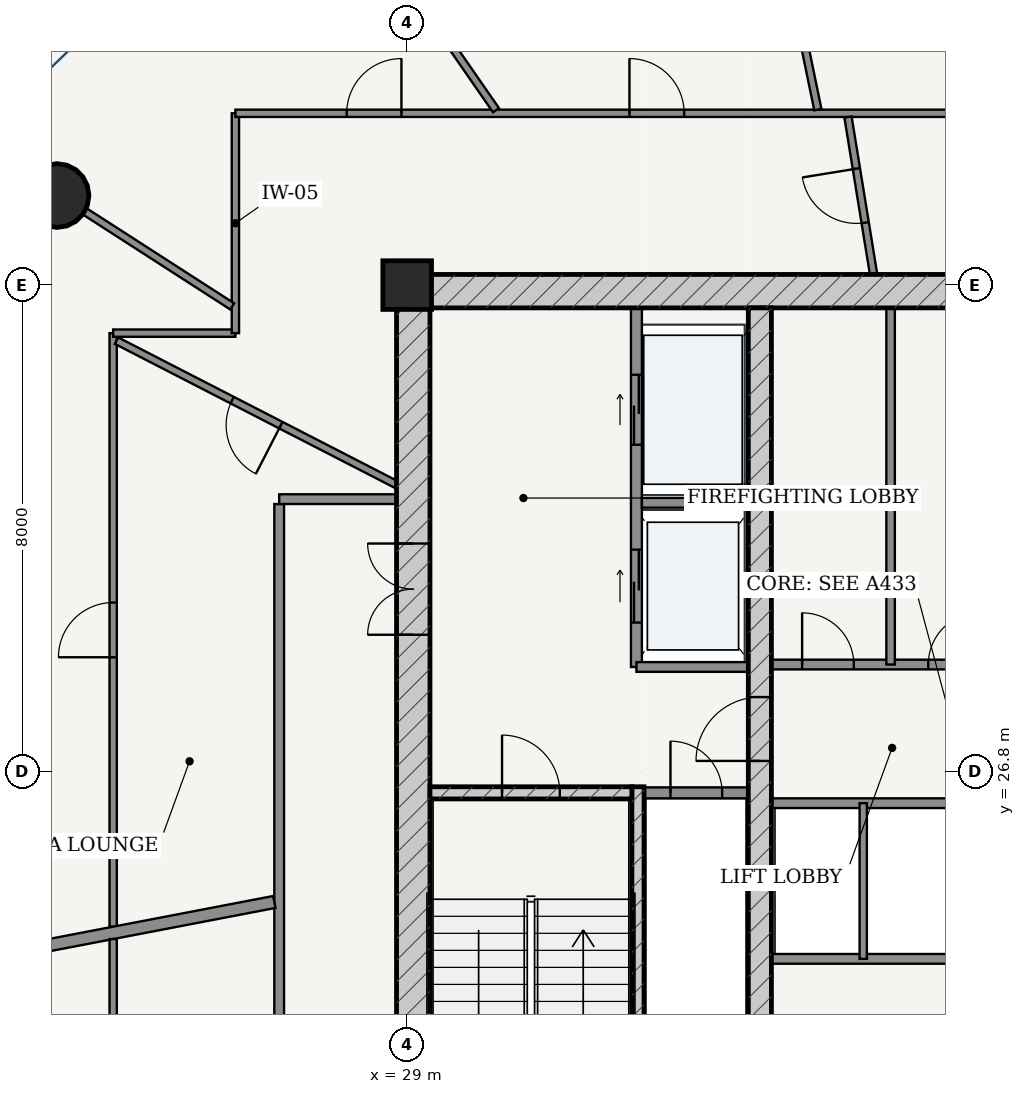
"""IFC4 building model, lengths in metres.
Left out: names, types, materials, properties, quantities, classifications, styles, units other than length and angle.
Written with IfcOpenShell. Run it as: python <this file> out.ifc"""

import sys

from ifc_helpers import new_model, si_unit, direction, frame, frame_2d, origin, origin_2d, place, context, subcontext, project, spatial, rectangle, hollow_circle, extrude, source, transform, mapped, element, fill, save


model = new_model("IFC4")
c1 = context("Model", 3, precision=1e-05, world=origin(), true_north=direction((-0.2419218956, 0.970295726276)))
c2 = subcontext(c1, "Body", "Model", "MODEL_VIEW")
j1 = project(units=[si_unit("LENGTHUNIT", "METRE"), si_unit("PLANEANGLEUNIT", "RADIAN")], contexts=[c1])
p1 = place(None, origin())
s1 = spatial("IfcSite", under=j1, at=p1, CompositionType="ELEMENT")
p2 = place(p1, origin())
s2 = spatial("IfcBuilding", under=s1, at=p2, CompositionType="ELEMENT")
p3 = place(p2, frame((0.0, 0.0, 248.2)))
s3 = spatial("IfcBuildingStorey", under=s2, at=p3, CompositionType="ELEMENT", Elevation=248.2)
p4 = place(p3, frame((29.0, 34.8, 0.0), z_axis=(0.0, 0.0, 1.0), x_axis=(1.0, 0.0, 0.0)))
e1 = element("IfcColumn", 1, at=p4, inside=s3, PredefinedType="COLUMN", context=c2, shape_type="SweptSolid", body=[
    extrude(rectangle(XDim=0.8, YDim=0.8, at=origin_2d()), origin(), (0.0, 0.0, 1.0), 3.75),
])
p5 = place(p3, frame((28.825, 34.7, 0.0), z_axis=(0.0, 0.0, 1.0), x_axis=(1.0, 0.0, 0.0)))
e2 = element("IfcWall", 2, at=p5, inside=s3, PredefinedType="SHEAR", context=c2, shape_type="SweptSolid", body=[
    extrude(rectangle(XDim=18.35, YDim=0.55, at=frame_2d((9.175, 0.0))), origin(), (0.0, 0.0, 1.0), 3.49),
])
p6 = place(p3, frame((29.1, 19.175, 0.0), z_axis=(0.0, 0.0, 1.0), x_axis=(0.0, 1.0, 0.0)))
e3 = element("IfcWall", 3, at=p6, inside=s3, PredefinedType="SHEAR", context=c2, shape_type="SweptSolid", body=[
    extrude(rectangle(XDim=15.25, YDim=0.55, at=frame_2d((7.625, 0.0))), origin(), (0.0, 0.0, 1.0), 3.49),
])
p7 = place(p6, frame((9.875, 0.0, 0.0)))
e4 = element("IfcOpeningElement", 4, at=p7, cuts=e3, PredefinedType="OPENING", context=c2, shape_type="SweptSolid", body=[
    extrude(rectangle(XDim=1.5, YDim=2.2, at=frame_2d((0.75, 1.1))), frame((0.0, 0.285, 0.0), z_axis=(0.0, -1.0, 0.0), x_axis=(1.0, 0.0, 0.0)), (0.0, 0.0, 1.0), 0.57),
])
p8 = place(p3, frame((32.795, 19.175, 0.0), z_axis=(0.0, 0.0, 1.0), x_axis=(0.0, 1.0, 0.0)))
e5 = element("IfcWall", 5, at=p8, inside=s3, PredefinedType="SOLIDWALL", context=c2, shape_type="SweptSolid", body=[
    extrude(rectangle(XDim=7.375, YDim=0.2, at=frame_2d((3.688, 0.0))), origin(), (0.0, 0.0, 1.0), 3.49),
])
p9 = place(p3, frame((29.375, 26.45, 0.0), z_axis=(0.0, 0.0, 1.0), x_axis=(1.0, 0.0, 0.0)))
e6 = element("IfcWall", 6, at=p9, inside=s3, PredefinedType="SOLIDWALL", context=c2, shape_type="SweptSolid", body=[
    extrude(rectangle(XDim=3.32, YDim=0.2, at=frame_2d((1.66, 0.0))), origin(), (0.0, 0.0, 1.0), 3.49),
])
p10 = place(p9, frame((1.185, 0.0, 0.0)))
e7 = element("IfcOpeningElement", 7, at=p10, cuts=e6, PredefinedType="OPENING", context=c2, shape_type="SweptSolid", body=[
    extrude(rectangle(XDim=0.95, YDim=2.15, at=frame_2d((0.475, 1.075))), frame((0.0, 0.11, 0.0), z_axis=(0.0, -1.0, 0.0), x_axis=(1.0, 0.0, 0.0)), (0.0, 0.0, 1.0), 0.22),
])
p11 = place(p3, frame((34.8, 19.175, 0.0), z_axis=(0.0, 0.0, 1.0), x_axis=(0.0, 1.0, 0.0)))
e8 = element("IfcWall", 8, at=p11, inside=s3, PredefinedType="SHEAR", context=c2, shape_type="SweptSolid", body=[
    extrude(rectangle(XDim=15.25, YDim=0.38, at=frame_2d((7.625, 0.0))), origin(), (0.0, 0.0, 1.0), 3.49),
])
p12 = place(p11, frame((7.8, 0.0, 0.0)))
e9 = element("IfcOpeningElement", 9, at=p12, cuts=e8, PredefinedType="OPENING", context=c2, shape_type="SweptSolid", body=[
    extrude(rectangle(XDim=1.05, YDim=2.15, at=frame_2d((0.525, 1.075))), frame((0.0, 0.2, 0.0), z_axis=(0.0, -1.0, 0.0), x_axis=(1.0, 0.0, 0.0)), (0.0, 0.0, 1.0), 0.4),
])
p13 = place(p3, frame((23.241, 36.272, 0.0), z_axis=(0.0, 0.0, 1.0), x_axis=(1.0, 0.0, 0.0)))
e10 = element("IfcColumn", 10, at=p13, inside=s3, PredefinedType="COLUMN", context=c2, shape_type="SweptSolid", body=[
    extrude(hollow_circle(Radius=0.525, WallThickness=0.035, at=origin_2d()), origin(), (0.0, 0.0, 1.0), 3.75),
])
p14 = place(p3, frame((32.9, 26.45, 0.0), z_axis=(0.0, 0.0, 1.0), x_axis=(1.0, 0.0, 0.0)))
e11 = element("IfcWall", 11, at=p14, inside=s3, PredefinedType="PARTITIONING", context=c2, shape_type="SweptSolid", body=[
    extrude(rectangle(XDim=1.71, YDim=0.18, at=frame_2d((0.855, 0.0))), origin(), (0.0, 0.0, 1.0), 3.49),
])
p15 = place(p14, frame((0.43, 0.0, 0.0)))
e12 = element("IfcOpeningElement", 12, at=p15, cuts=e11, PredefinedType="OPENING", context=c2, shape_type="SweptSolid", body=[
    extrude(rectangle(XDim=0.85, YDim=2.1, at=frame_2d((0.425, 1.05))), frame((0.0, 0.1, 0.0), z_axis=(0.0, -1.0, 0.0), x_axis=(1.0, 0.0, 0.0)), (0.0, 0.0, 1.0), 0.2),
])
p16 = place(p3, frame((32.77, 28.52, 0.0), z_axis=(0.0, 0.0, 1.0), x_axis=(0.0, 1.0, 0.0)))
e13 = element("IfcWall", 13, at=p16, inside=s3, PredefinedType="PARTITIONING", context=c2, shape_type="SweptSolid", body=[
    extrude(rectangle(XDim=5.905, YDim=0.18, at=frame_2d((2.953, 0.0))), origin(), (0.0, 0.0, 1.0), 3.49),
])
p17 = place(p16, frame((3.655, 0.0, 0.0)))
e14 = element("IfcOpeningElement", 14, at=p17, cuts=e13, PredefinedType="OPENING", context=c2, shape_type="SweptSolid", body=[
    extrude(rectangle(XDim=1.15, YDim=2.2, at=frame_2d((0.575, 1.1))), frame((0.0, 0.1, 0.0), z_axis=(0.0, -1.0, 0.0), x_axis=(1.0, 0.0, 0.0)), (0.0, 0.0, 1.0), 0.2),
])
p18 = place(p16, frame((0.73, 0.0, 0.0)))
e15 = element("IfcOpeningElement", 15, at=p18, cuts=e13, PredefinedType="OPENING", context=c2, shape_type="SweptSolid", body=[
    extrude(rectangle(XDim=1.2, YDim=2.25, at=frame_2d((0.6, 1.125))), frame((0.0, 0.1, 0.0), z_axis=(0.0, -1.0, 0.0), x_axis=(1.0, 0.0, 0.0)), (0.0, 0.0, 1.0), 0.2),
])
p19 = place(p3, frame((32.86, 31.22, 0.0), z_axis=(0.0, 0.0, 1.0), x_axis=(1.0, 0.0, 0.0)))
e16 = element("IfcWall", 16, at=p19, inside=s3, PredefinedType="PARTITIONING", context=c2, shape_type="SweptSolid", body=[
    extrude(rectangle(XDim=1.75, YDim=0.16, at=frame_2d((0.875, 0.0))), origin(), (0.0, 0.0, 1.0), 3.49),
])
p20 = place(p3, frame((32.77, 28.52, 0.0), z_axis=(0.0, 0.0, 1.0), x_axis=(1.0, 0.0, 0.0)))
e17 = element("IfcWall", 17, at=p20, inside=s3, PredefinedType="PARTITIONING", context=c2, shape_type="SweptSolid", body=[
    extrude(rectangle(XDim=1.84, YDim=0.16, at=frame_2d((0.92, 0.0))), origin(), (0.0, 0.0, 1.0), 3.49),
])
p21 = place(p3, frame((34.99, 28.56, 0.0), z_axis=(0.0, 0.0, 1.0), x_axis=(1.0, 0.0, 0.0)))
e18 = element("IfcWall", 18, at=p21, inside=s3, PredefinedType="PARTITIONING", context=c2, shape_type="SweptSolid", body=[
    extrude(rectangle(XDim=6.02, YDim=0.16, at=frame_2d((3.01, 0.0))), origin(), (0.0, 0.0, 1.0), 3.49),
])
p22 = place(p21, frame((0.505, 0.0, 0.0)))
e19 = element("IfcOpeningElement", 19, at=p22, cuts=e18, PredefinedType="OPENING", context=c2, shape_type="SweptSolid", body=[
    extrude(rectangle(XDim=0.85, YDim=2.1, at=frame_2d((0.425, 1.05))), frame((0.0, 0.09, 0.0), z_axis=(0.0, -1.0, 0.0), x_axis=(1.0, 0.0, 0.0)), (0.0, 0.0, 1.0), 0.18),
])
p23 = place(p21, frame((2.58, 0.0, 0.0)))
e20 = element("IfcOpeningElement", 20, at=p23, cuts=e18, PredefinedType="OPENING", context=c2, shape_type="SweptSolid", body=[
    extrude(rectangle(XDim=0.86, YDim=2.1, at=frame_2d((0.43, 1.05))), frame((0.0, 0.09, 0.0), z_axis=(0.0, -1.0, 0.0), x_axis=(1.0, 0.0, 0.0)), (0.0, 0.0, 1.0), 0.18),
])
p24 = place(p21, frame((4.665, 0.0, 0.0)))
e21 = element("IfcOpeningElement", 21, at=p24, cuts=e18, PredefinedType="OPENING", context=c2, shape_type="SweptSolid", body=[
    extrude(rectangle(XDim=0.85, YDim=2.1, at=frame_2d((0.425, 1.05))), frame((0.0, 0.09, 0.0), z_axis=(0.0, -1.0, 0.0), x_axis=(1.0, 0.0, 0.0)), (0.0, 0.0, 1.0), 0.18),
])
p25 = place(p3, frame((36.95, 28.56, 0.0), z_axis=(0.0, 0.0, 1.0), x_axis=(0.0, 1.0, 0.0)))
e22 = element("IfcWall", 22, at=p25, inside=s3, PredefinedType="PARTITIONING", context=c2, shape_type="SweptSolid", body=[
    extrude(rectangle(XDim=5.865, YDim=0.14, at=frame_2d((2.933, 0.0))), origin(), (0.0, 0.0, 1.0), 3.49),
])
p26 = place(p3, frame((34.99, 26.28, 0.0), z_axis=(0.0, 0.0, 1.0), x_axis=(1.0, 0.0, 0.0)))
e23 = element("IfcWall", 23, at=p26, inside=s3, PredefinedType="PARTITIONING", context=c2, shape_type="SweptSolid", body=[
    extrude(rectangle(XDim=6.02, YDim=0.16, at=frame_2d((3.01, 0.0))), origin(), (0.0, 0.0, 1.0), 3.49),
])
p27 = place(p26, frame((3.215, 0.0, 0.0)))
e24 = element("IfcOpeningElement", 24, at=p27, cuts=e23, PredefinedType="OPENING", context=c2, shape_type="SweptSolid", body=[
    extrude(rectangle(XDim=1.1, YDim=2.2, at=frame_2d((0.55, 1.1))), frame((0.0, 0.09, 0.0), z_axis=(0.0, -1.0, 0.0), x_axis=(1.0, 0.0, 0.0)), (0.0, 0.0, 1.0), 0.18),
])
p28 = place(p26, frame((4.695, 0.0, 0.0)))
e25 = element("IfcOpeningElement", 25, at=p28, cuts=e23, PredefinedType="OPENING", context=c2, shape_type="SweptSolid", body=[
    extrude(rectangle(XDim=1.1, YDim=2.2, at=frame_2d((0.55, 1.1))), frame((0.0, 0.09, 0.0), z_axis=(0.0, -1.0, 0.0), x_axis=(1.0, 0.0, 0.0)), (0.0, 0.0, 1.0), 0.18),
])
p29 = place(p3, frame((34.99, 23.72, 0.0), z_axis=(0.0, 0.0, 1.0), x_axis=(1.0, 0.0, 0.0)))
e26 = element("IfcWall", 26, at=p29, inside=s3, PredefinedType="PARTITIONING", context=c2, shape_type="SweptSolid", body=[
    extrude(rectangle(XDim=6.02, YDim=0.16, at=frame_2d((3.01, 0.0))), origin(), (0.0, 0.0, 1.0), 3.49),
])
p30 = place(p3, frame((36.5, 23.72, 0.0), z_axis=(0.0, 0.0, 1.0), x_axis=(0.0, 1.0, 0.0)))
e27 = element("IfcWall", 27, at=p30, inside=s3, PredefinedType="PARTITIONING", context=c2, shape_type="SweptSolid", body=[
    extrude(rectangle(XDim=2.56, YDim=0.12, at=frame_2d((1.28, 0.0))), origin(), (0.0, 0.0, 1.0), 3.49),
])
p31 = place(p3, frame((26.895, 17.275, 0.0), z_axis=(0.0, 0.0, 1.0), x_axis=(0.0, 1.0, 0.0)))
e28 = element("IfcWall", 28, at=p31, inside=s3, PredefinedType="PARTITIONING", context=c2, shape_type="SweptSolid", body=[
    extrude(rectangle(XDim=13.925, YDim=0.16, at=frame_2d((6.962, 0.0))), origin(), (0.0, 0.0, 1.0), 3.015),
])
p32 = place(p3, frame((26.895, 31.28, 0.0), z_axis=(0.0, 0.0, 1.0), x_axis=(1.0, 0.0, 0.0)))
e29 = element("IfcWall", 29, at=p32, inside=s3, PredefinedType="PARTITIONING", context=c2, shape_type="SweptSolid", body=[
    extrude(rectangle(XDim=1.93, YDim=0.16, at=frame_2d((0.965, 0.0))), origin(), (0.0, 0.0, 1.0), 3.49),
])
p33 = place(p3, frame((24.165, 24.249, 0.0), z_axis=(0.0, 0.0, 1.0), x_axis=(0.0, 1.0, 0.0)))
e30 = element("IfcWall", 30, at=p33, inside=s3, PredefinedType="PARTITIONING", context=c2, shape_type="SweptSolid", body=[
    extrude(rectangle(XDim=9.761, YDim=0.12, at=frame_2d((4.88, 0.0))), origin(), (0.0, 0.0, 1.0), 3.015),
])
p34 = place(p33, frame((4.43, 0.0, 0.0)))
e31 = element("IfcOpeningElement", 31, at=p34, cuts=e30, PredefinedType="OPENING", context=c2, shape_type="SweptSolid", body=[
    extrude(rectangle(XDim=0.9, YDim=2.15, at=frame_2d((0.45, 1.075))), frame((0.0, 0.07, 0.0), z_axis=(0.0, -1.0, 0.0), x_axis=(1.0, 0.0, 0.0)), (0.0, 0.0, 1.0), 0.14),
])
p35 = place(p3, frame((24.165, 34.01, 0.0), z_axis=(0.0, 0.0, 1.0), x_axis=(1.0, 0.0, 0.0)))
e32 = element("IfcWall", 32, at=p35, inside=s3, PredefinedType="PARTITIONING", context=c2, shape_type="SweptSolid", body=[
    extrude(rectangle(XDim=2.01, YDim=0.12, at=frame_2d((1.005, 0.0))), origin(), (0.0, 0.0, 1.0), 3.209),
])
p36 = place(p3, frame((26.175, 34.01, 0.0), z_axis=(0.0, 0.0, 1.0), x_axis=(0.0, 1.0, 0.0)))
e33 = element("IfcWall", 33, at=p36, inside=s3, PredefinedType="PARTITIONING", context=c2, shape_type="SweptSolid", body=[
    extrude(rectangle(XDim=3.615, YDim=0.12, at=frame_2d((1.808, 0.0))), origin(), (0.0, 0.0, 1.0), 3.015),
])
p37 = place(p3, frame((26.175, 37.625, 0.0), z_axis=(0.0, 0.0, 1.0), x_axis=(1.0, 0.0, 0.0)))
e34 = element("IfcWall", 34, at=p37, inside=s3, PredefinedType="PARTITIONING", context=c2, shape_type="SweptSolid", body=[
    extrude(rectangle(XDim=23.65, YDim=0.12, at=frame_2d((11.825, 0.0))), origin(), (0.0, 0.0, 1.0), 3.015),
])
p38 = place(p37, frame((12.791, 0.0, 0.0)))
e35 = element("IfcOpeningElement", 35, at=p38, cuts=e34, PredefinedType="OPENING", context=c2, shape_type="SweptSolid", body=[
    extrude(rectangle(XDim=0.9, YDim=2.15, at=frame_2d((0.45, 1.075))), frame((0.0, 0.07, 0.0), z_axis=(0.0, -1.0, 0.0), x_axis=(1.0, 0.0, 0.0)), (0.0, 0.0, 1.0), 0.14),
])
p39 = place(p37, frame((6.48, 0.0, 0.0)))
e36 = element("IfcOpeningElement", 36, at=p39, cuts=e34, PredefinedType="OPENING", context=c2, shape_type="SweptSolid", body=[
    extrude(rectangle(XDim=0.9, YDim=2.15, at=frame_2d((0.45, 1.075))), frame((0.0, 0.07, 0.0), z_axis=(0.0, -1.0, 0.0), x_axis=(1.0, 0.0, 0.0)), (0.0, 0.0, 1.0), 0.14),
])
p40 = place(p37, frame((1.831, 0.0, 0.0)))
e37 = element("IfcOpeningElement", 37, at=p40, cuts=e34, PredefinedType="OPENING", context=c2, shape_type="SweptSolid", body=[
    extrude(rectangle(XDim=0.9, YDim=2.15, at=frame_2d((0.45, 1.075))), frame((0.0, 0.07, 0.0), z_axis=(0.0, -1.0, 0.0), x_axis=(1.0, 0.0, 0.0)), (0.0, 0.0, 1.0), 0.14),
])
p41 = place(p3, frame((35.754, 37.686, 0.0), z_axis=(0.0, 0.0, 1.0), x_axis=(-0.202105877204, 0.979363678313, 0.0)))
e38 = element("IfcWall", 38, at=p41, inside=s3, PredefinedType="PARTITIONING", context=c2, shape_type="SweptSolid", body=[
    extrude(rectangle(XDim=7.512, YDim=0.12, at=frame_2d((3.756, 0.0))), origin(), (0.0, 0.0, 1.0), 3.015),
])
p42 = place(p3, frame((30.461, 37.676, 0.0), z_axis=(0.0, 0.0, 1.0), x_axis=(-0.569689482466, 0.821860020665, 0.0)))
e39 = element("IfcWall", 39, at=p42, inside=s3, PredefinedType="PARTITIONING", context=c2, shape_type="SweptSolid", body=[
    extrude(rectangle(XDim=5.585, YDim=0.12, at=frame_2d((2.792, 0.0))), origin(), (0.0, 0.0, 1.0), 3.015),
])
p43 = place(p3, frame((26.123, 34.45, 0.0), z_axis=(0.0, 0.0, 1.0), x_axis=(-0.840703033126, 0.541496454367, 0.0)))
e40 = element("IfcWall", 40, at=p43, inside=s3, PredefinedType="PARTITIONING", context=c2, shape_type="SweptSolid", body=[
    extrude(rectangle(XDim=4.958, YDim=0.12, at=frame_2d((2.479, 0.0))), origin(), (0.0, 0.0, 1.0), 3.015),
])
p44 = place(p3, frame((36.67, 34.977, 0.0), z_axis=(0.0, 0.0, 1.0), x_axis=(-0.160605953374, 0.98701860557, 0.0)))
e41 = element("IfcWall", 41, at=p44, inside=s3, PredefinedType="PARTITIONING", context=c2, shape_type="SweptSolid", body=[
    extrude(rectangle(XDim=2.621, YDim=0.12, at=frame_2d((1.31, 0.0))), origin(), (0.0, 0.0, 1.0), 2.575),
])
p45 = place(p44, frame((0.86, 0.0, 0.0)))
e42 = element("IfcOpeningElement", 42, at=p45, cuts=e41, PredefinedType="OPENING", context=c2, shape_type="SweptSolid", body=[
    extrude(rectangle(XDim=0.9, YDim=2.15, at=frame_2d((0.45, 1.075))), frame((0.0, 0.07, 0.0), z_axis=(0.0, -1.0, 0.0), x_axis=(1.0, 0.0, 0.0)), (0.0, 0.0, 1.0), 0.14),
])
p46 = place(p3, frame((28.825, 31.518, 0.0), z_axis=(0.0, 0.0, 1.0), x_axis=(-0.889305882583, 0.457312854842, 0.0)))
e43 = element("IfcWall", 43, at=p46, inside=s3, PredefinedType="PARTITIONING", context=c2, shape_type="SweptSolid", body=[
    extrude(rectangle(XDim=5.178, YDim=0.12, at=frame_2d((2.589, 0.0))), origin(), (0.0, 0.0, 1.0), 3.209),
])
p47 = place(p46, frame((2.139, 0.0, 0.0)))
e44 = element("IfcOpeningElement", 44, at=p47, cuts=e43, PredefinedType="OPENING", context=c2, shape_type="SweptSolid", body=[
    extrude(rectangle(XDim=0.9, YDim=2.15, at=frame_2d((0.45, 1.075))), frame((0.0, 0.07, 0.0), z_axis=(0.0, -1.0, 0.0), x_axis=(1.0, 0.0, 0.0)), (0.0, 0.0, 1.0), 0.14),
])
p48 = place(p3, frame((26.815, 24.656, 0.0), z_axis=(0.0, 0.0, 1.0), x_axis=(-0.982109889803, -0.188308694305, 0.0)))
e45 = element("IfcWall", 45, at=p48, inside=s3, PredefinedType="PARTITIONING", context=c2, shape_type="SweptSolid", body=[
    extrude(rectangle(XDim=7.884, YDim=0.2, at=frame_2d((3.942, 0.0))), origin(), (0.0, 0.0, 1.0), 3.015),
])
p49 = place(p3, frame((24.165, 14.465, 0.0), z_axis=(0.0, 0.0, 1.0), x_axis=(0.0, 1.0, 0.0)))
e46 = element("IfcWall", 46, at=p49, inside=s3, PredefinedType="PARTITIONING", context=c2, shape_type="SweptSolid", body=[
    extrude(rectangle(XDim=9.58, YDim=0.12, at=frame_2d((4.79, 0.0))), origin(), (0.0, 0.0, 1.0), 3.015),
])
p50 = place(p49, frame((0.879, 0.0, 0.0)))
e47 = element("IfcOpeningElement", 47, at=p50, cuts=e46, PredefinedType="OPENING", context=c2, shape_type="SweptSolid", body=[
    extrude(rectangle(XDim=0.9, YDim=2.15, at=frame_2d((0.45, 1.075))), frame((0.0, 0.07, 0.0), z_axis=(0.0, -1.0, 0.0), x_axis=(1.0, 0.0, 0.0)), (0.0, 0.0, 1.0), 0.14),
])
m1 = source(origin(), c2, "Body", "SweptSolid", [
    extrude(rectangle(XDim=1.5, YDim=2.2, at=frame_2d((0.75, 1.1))), frame((0.0, 0.025, 0.0), z_axis=(0.0, -1.0, 0.0), x_axis=(1.0, 0.0, 0.0)), (0.0, 0.0, 1.0), 0.05),
])
p51 = place(p7, origin())
e48 = element("IfcDoor", 48, at=p51, inside=s3, OperationType="DOUBLE_DOOR_SINGLE_SWING", PredefinedType="DOOR", context=c2, shape_type="MappedRepresentation", body=[
    mapped(m1, transform((0.0, 0.0, 0.0), scale=1.0)),
])
fill(e4, e48)
m2 = source(origin(), c2, "Body", "SweptSolid", [
    extrude(rectangle(XDim=1.05, YDim=2.15, at=frame_2d((0.525, 1.075))), frame((0.0, 0.025, 0.0), z_axis=(0.0, -1.0, 0.0), x_axis=(1.0, 0.0, 0.0)), (0.0, 0.0, 1.0), 0.05),
])
p52 = place(p12, origin())
e49 = element("IfcDoor", 49, at=p52, inside=s3, OperationType="SINGLE_SWING_LEFT", PredefinedType="DOOR", context=c2, shape_type="MappedRepresentation", body=[
    mapped(m2, transform((0.0, 0.0, 0.0), scale=1.0)),
])
fill(e9, e49)
m3 = source(origin(), c2, "Body", "SweptSolid", [
    extrude(rectangle(XDim=0.95, YDim=2.15, at=frame_2d((0.475, 1.075))), frame((0.0, 0.025, 0.0), z_axis=(0.0, -1.0, 0.0), x_axis=(1.0, 0.0, 0.0)), (0.0, 0.0, 1.0), 0.05),
])
p53 = place(p10, origin())
e50 = element("IfcDoor", 50, at=p53, inside=s3, OperationType="SINGLE_SWING_LEFT", PredefinedType="DOOR", context=c2, shape_type="MappedRepresentation", body=[
    mapped(m3, transform((0.0, 0.0, 0.0), scale=1.0)),
])
fill(e7, e50)
m4 = source(origin(), c2, "Body", "SweptSolid", [
    extrude(rectangle(XDim=0.85, YDim=2.1, at=frame_2d((0.425, 1.05))), frame((0.0, 0.025, 0.0), z_axis=(0.0, -1.0, 0.0), x_axis=(1.0, 0.0, 0.0)), (0.0, 0.0, 1.0), 0.05),
])
p54 = place(p15, origin())
e51 = element("IfcDoor", 51, at=p54, inside=s3, OperationType="SINGLE_SWING_LEFT", PredefinedType="DOOR", context=c2, shape_type="MappedRepresentation", body=[
    mapped(m4, transform((0.0, 0.0, 0.0), scale=1.0)),
])
fill(e12, e51)
p55 = place(p22, origin())
e52 = element("IfcDoor", 52, at=p55, inside=s3, OperationType="SINGLE_SWING_LEFT", PredefinedType="DOOR", context=c2, shape_type="MappedRepresentation", body=[
    mapped(m4, transform((0.0, 0.0, 0.0), scale=1.0)),
])
fill(e19, e52)
m5 = source(origin(), c2, "Body", "SweptSolid", [
    extrude(rectangle(XDim=0.86, YDim=2.1, at=frame_2d((0.43, 1.05))), frame((0.0, 0.025, 0.0), z_axis=(0.0, -1.0, 0.0), x_axis=(1.0, 0.0, 0.0)), (0.0, 0.0, 1.0), 0.05),
])
p56 = place(p23, origin())
e53 = element("IfcDoor", 53, at=p56, inside=s3, OperationType="SINGLE_SWING_RIGHT", PredefinedType="DOOR", context=c2, shape_type="MappedRepresentation", body=[
    mapped(m5, transform((0.0, 0.0, 0.0), scale=1.0)),
])
fill(e20, e53)
m6 = source(origin(), c2, "Body", "SweptSolid", [
    extrude(rectangle(XDim=1.15, YDim=2.2, at=frame_2d((0.575, 1.1))), frame((0.0, 0.025, 0.0), z_axis=(0.0, -1.0, 0.0), x_axis=(1.0, 0.0, 0.0)), (0.0, 0.0, 1.0), 0.05),
])
p57 = place(p17, origin())
e54 = element("IfcDoor", 54, at=p57, inside=s3, OperationType="DOUBLE_DOOR_SLIDING", PredefinedType="DOOR", context=c2, shape_type="MappedRepresentation", body=[
    mapped(m6, transform((0.0, 0.0, 0.0), scale=1.0)),
])
fill(e14, e54)
m7 = source(origin(), c2, "Body", "SweptSolid", [
    extrude(rectangle(XDim=1.2, YDim=2.25, at=frame_2d((0.6, 1.125))), frame((0.0, 0.025, 0.0), z_axis=(0.0, -1.0, 0.0), x_axis=(1.0, 0.0, 0.0)), (0.0, 0.0, 1.0), 0.05),
])
p58 = place(p18, origin())
e55 = element("IfcDoor", 55, at=p58, inside=s3, OperationType="DOUBLE_DOOR_SLIDING", PredefinedType="DOOR", context=c2, shape_type="MappedRepresentation", body=[
    mapped(m7, transform((0.0, 0.0, 0.0), scale=1.0)),
])
fill(e15, e55)
m8 = source(origin(), c2, "Body", "SweptSolid", [
    extrude(rectangle(XDim=0.9, YDim=2.15, at=frame_2d((0.45, 1.075))), frame((0.0, 0.025, 0.0), z_axis=(0.0, -1.0, 0.0), x_axis=(1.0, 0.0, 0.0)), (0.0, 0.0, 1.0), 0.05),
])
p59 = place(p45, origin())
e56 = element("IfcDoor", 56, at=p59, inside=s3, OperationType="SINGLE_SWING_RIGHT", PredefinedType="DOOR", context=c2, shape_type="MappedRepresentation", body=[
    mapped(m8, transform((0.0, 0.0, 0.0), scale=1.0)),
])
fill(e42, e56)
p60 = place(p47, origin())
e57 = element("IfcDoor", 57, at=p60, inside=s3, OperationType="SINGLE_SWING_LEFT", PredefinedType="DOOR", context=c2, shape_type="MappedRepresentation", body=[
    mapped(m8, transform((0.0, 0.0, 0.0), scale=1.0)),
])
fill(e44, e57)
p61 = place(p39, origin())
e58 = element("IfcDoor", 58, at=p61, inside=s3, OperationType="SINGLE_SWING_LEFT", PredefinedType="DOOR", context=c2, shape_type="MappedRepresentation", body=[
    mapped(m8, transform((0.0, 0.0, 0.0), scale=1.0)),
])
fill(e36, e58)
p62 = place(p40, origin())
e59 = element("IfcDoor", 59, at=p62, inside=s3, OperationType="SINGLE_SWING_RIGHT", PredefinedType="DOOR", context=c2, shape_type="MappedRepresentation", body=[
    mapped(m8, transform((0.0, 0.0, 0.0), scale=1.0)),
])
fill(e37, e59)
p63 = place(p34, origin())
e60 = element("IfcDoor", 60, at=p63, inside=s3, OperationType="SINGLE_SWING_LEFT", PredefinedType="DOOR", context=c2, shape_type="MappedRepresentation", body=[
    mapped(m8, transform((0.0, 0.0, 0.0), scale=1.0)),
])
fill(e31, e60)
save(model, sys.argv[1])
